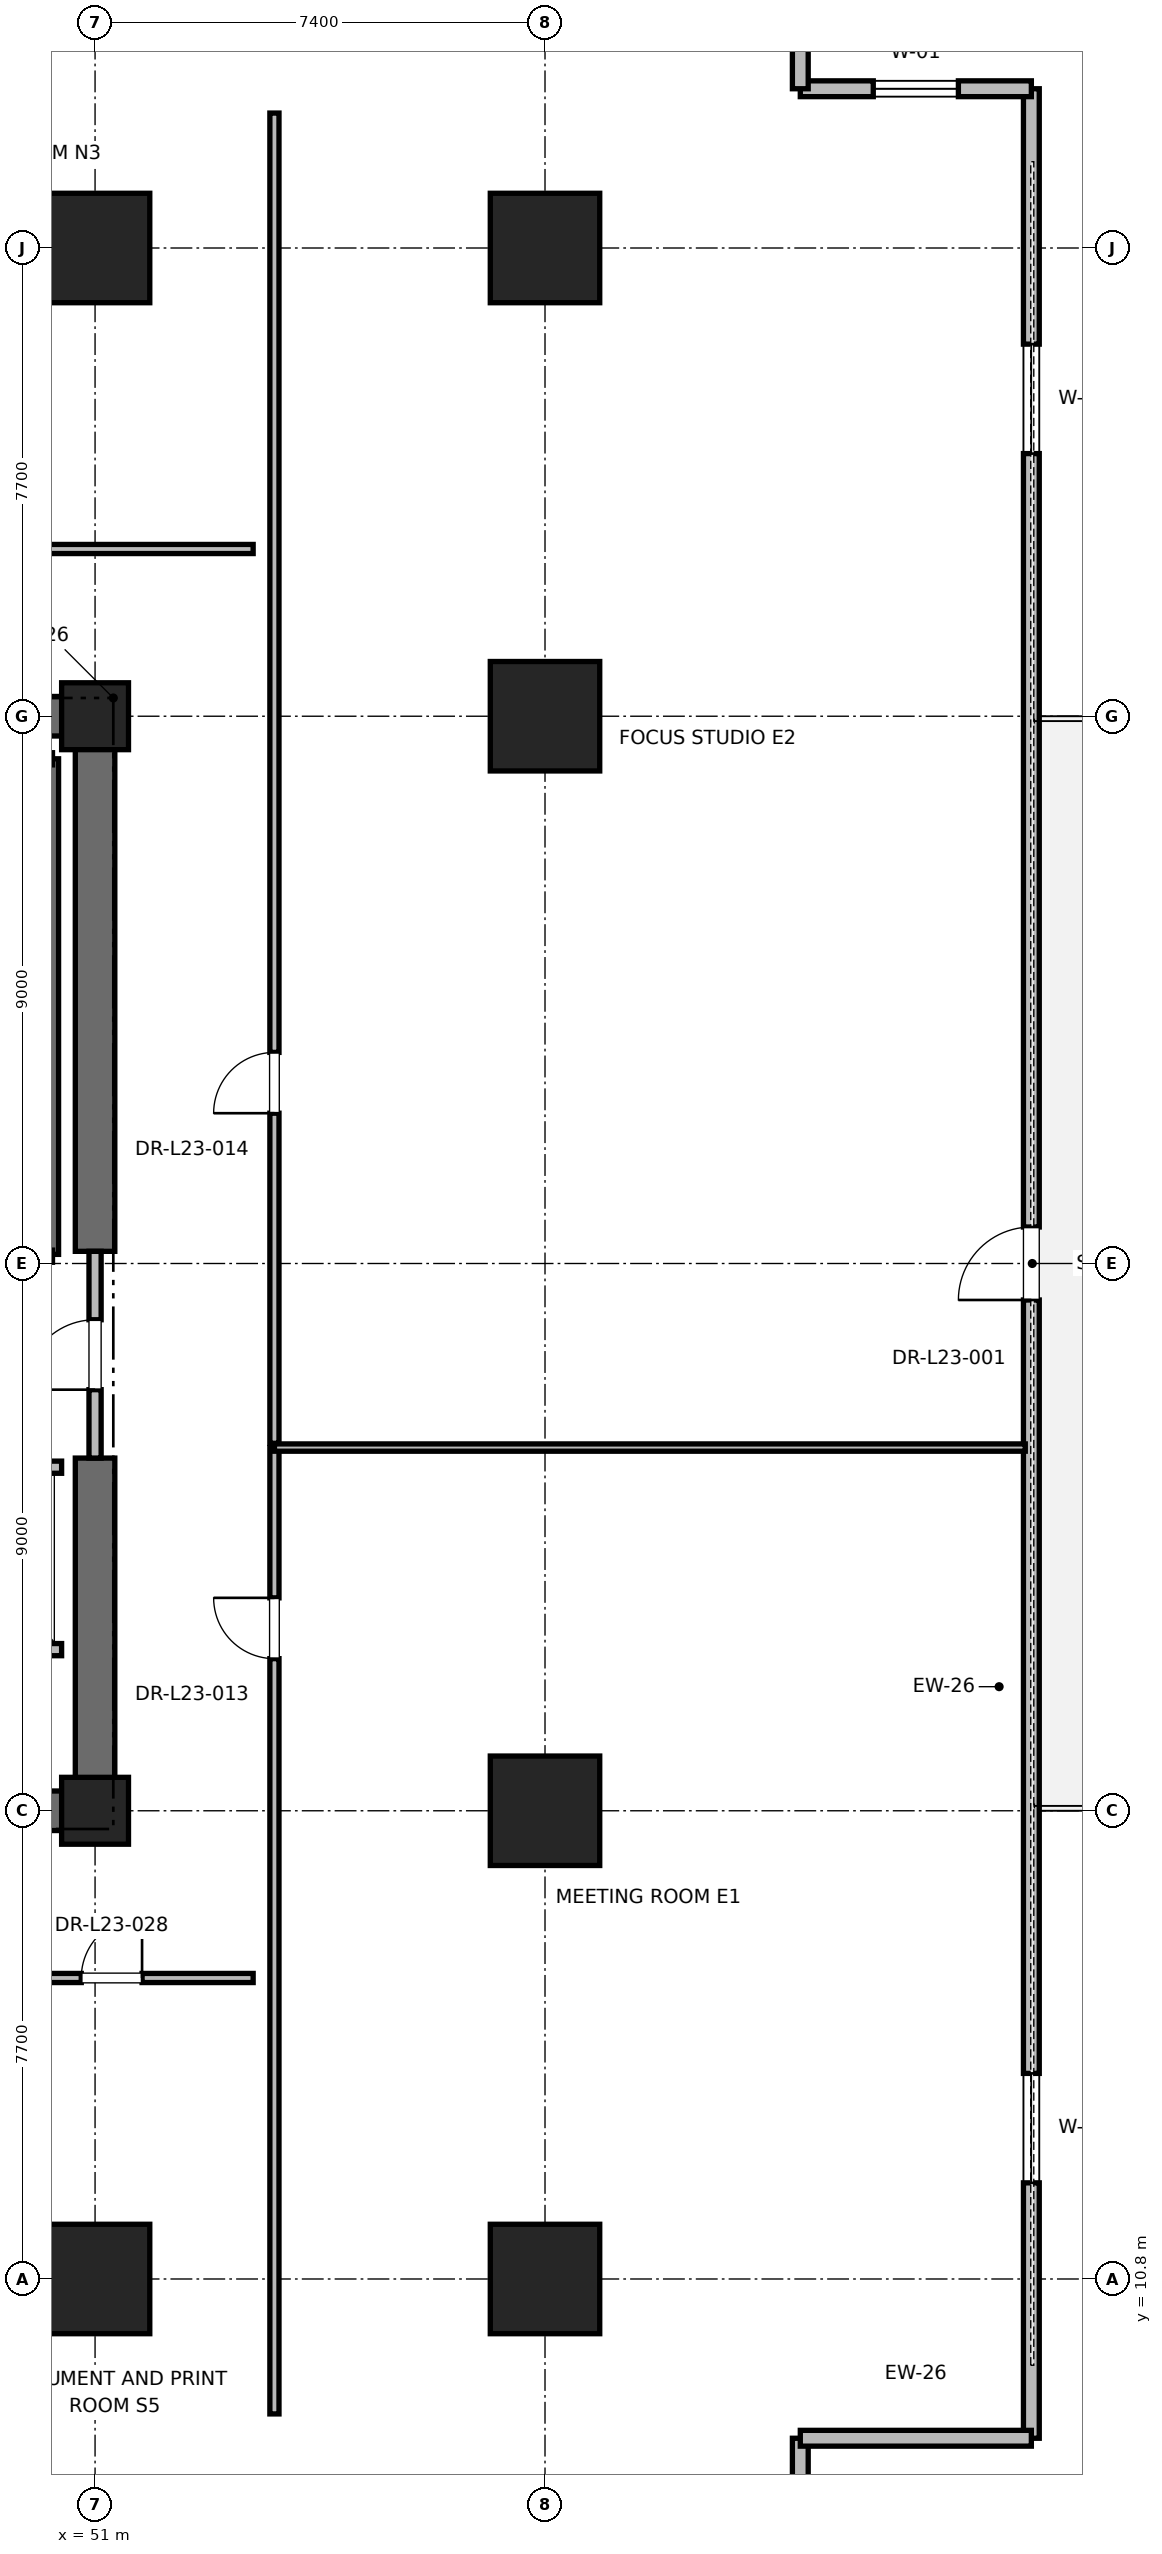
"""IFC4 building model, lengths in metres.
Left out: names, types, materials, properties, quantities, classifications, styles, units other than length and angle.
Written with IfcOpenShell. Run it as: python <this file> out.ifc"""

import sys

from ifc_helpers import new_model, si_unit, direction, frame, frame_2d, origin, origin_2d, place, context, subcontext, project, spatial, rectangle, extrude, element, fill, save


model = new_model("IFC4")
c1 = context("Model", 3, precision=1e-05, world=origin(), true_north=direction((0.0, 1.0)))
c2 = subcontext(c1, "Body", "Model", "MODEL_VIEW")
j1 = project(units=[si_unit("LENGTHUNIT", "METRE"), si_unit("PLANEANGLEUNIT", "RADIAN")], contexts=[c1])
p1 = place(None, origin())
s1 = spatial("IfcSite", under=j1, at=p1, CompositionType="ELEMENT")
p2 = place(p1, origin())
s2 = spatial("IfcBuilding", under=s1, at=p2, CompositionType="ELEMENT")
p3 = place(p2, frame((0.0, 0.0, 99.6)))
s3 = spatial("IfcBuildingStorey", under=s2, at=p3, CompositionType="ELEMENT", Elevation=99.6)
for number, where, z_axis, x_axis in (
    (1, (51.0, 10.8, 0.0), (0.0, 0.0, 1.0), (1.0, 0.0, 0.0)),
    (2, (51.0, 44.2, 0.0), (0.0, 0.0, 1.0), (1.0, 0.0, 0.0)),
    (3, (58.4, 18.5, 0.0), (0.0, 0.0, 1.0), (1.0, 0.0, 0.0)),
    (4, (58.4, 36.5, 0.0), (0.0, 0.0, 1.0), (1.0, 0.0, 0.0)),
    (5, (58.4, 10.8, 0.0), (0.0, 0.0, 1.0), (1.0, 0.0, 0.0)),
    (6, (58.4, 44.2, 0.0), (0.0, 0.0, 1.0), (1.0, 0.0, 0.0)),
):
    element("IfcColumn", number, at=place(p3, frame(where, z_axis=z_axis, x_axis=x_axis)), inside=s3, PredefinedType="COLUMN", context=c2, shape_type="SweptSolid", body=[
        extrude(rectangle(XDim=1.8, YDim=1.8, at=origin_2d()), origin(), (0.0, 0.0, 1.0), 4.0),
    ])
for number, where, z_axis, x_axis in (
    (7, (51.0, 18.5, 0.0), (0.0, 0.0, 1.0), (1.0, 0.0, 0.0)),
    (8, (51.0, 36.5, 0.0), (0.0, 0.0, 1.0), (1.0, 0.0, 0.0)),
):
    element("IfcColumn", number, at=place(p3, frame(where, z_axis=z_axis, x_axis=x_axis)), inside=s3, PredefinedType="PILASTER", context=c2, shape_type="SweptSolid", body=[
        extrude(rectangle(XDim=1.1, YDim=1.1, at=origin_2d()), origin(), (0.0, 0.0, 1.0), 4.0),
    ])
p4 = place(p3, frame((41.8, 18.5, 0.0), z_axis=(0.0, 0.0, 1.0), x_axis=(1.0, 0.0, 0.0)))
e9 = element("IfcWall", 9, at=p4, inside=s3, PredefinedType="SHEAR", context=c2, shape_type="SweptSolid", body=[
    extrude(rectangle(XDim=9.2, YDim=0.65, at=frame_2d((4.6, 0.0))), origin(), (0.0, 0.0, 1.0), 3.76),
])
for number, where, z_axis, x_axis in (
    (10, (45.2, 36.5, 0.0), (0.0, 0.0, 1.0), (1.0, 0.0, 0.0)),
    (11, (51.0, 18.5, 0.0), (0.0, 0.0, 1.0), (0.0, 1.0, 0.0)),
):
    element("IfcWall", number, at=place(p3, frame(where, z_axis=z_axis, x_axis=x_axis)), inside=s3, PredefinedType="SHEAR", context=c2, shape_type="SweptSolid", body=[
        extrude(rectangle(XDim=5.8, YDim=0.65, at=frame_2d((2.9, 0.0))), origin(), (0.0, 0.0, 1.0), 3.76),
    ])
p5 = place(p3, frame((51.0, 27.7, 0.0), z_axis=(0.0, 0.0, 1.0), x_axis=(0.0, 1.0, 0.0)))
e12 = element("IfcWall", 12, at=p5, inside=s3, PredefinedType="SHEAR", context=c2, shape_type="SweptSolid", body=[
    extrude(rectangle(XDim=8.8, YDim=0.65, at=frame_2d((4.4, 0.0))), origin(), (0.0, 0.0, 1.0), 3.76),
])
p6 = place(p3, frame((66.399, 8.181, 0.0), z_axis=(0.0, 0.0, 1.0), x_axis=(0.0, 1.0, 0.0)))
e13 = element("IfcWall", 13, at=p6, inside=s3, PredefinedType="PARAPET", context=c2, shape_type="SweptSolid", body=[
    extrude(rectangle(XDim=38.638, YDim=0.26, at=frame_2d((19.319, 0.0))), origin(), (0.0, 0.0, 1.0), 2.889),
])
p7 = place(p6, frame((4.2, 0.0, 0.85)))
e14 = element("IfcOpeningElement", 14, at=p7, cuts=e13, PredefinedType="OPENING", context=c2, shape_type="SweptSolid", body=[
    extrude(rectangle(XDim=1.8, YDim=2.2, at=frame_2d((0.9, 1.1))), frame((0.0, 0.13, 0.0), z_axis=(0.0, -1.0, 0.0), x_axis=(1.0, 0.0, 0.0)), (0.0, 0.0, 1.0), 0.26),
])
p8 = place(p6, frame((18.719, 0.0, 0.0)))
e15 = element("IfcOpeningElement", 15, at=p8, cuts=e13, PredefinedType="OPENING", context=c2, shape_type="SweptSolid", body=[
    extrude(rectangle(XDim=1.2, YDim=2.2, at=frame_2d((0.6, 1.1))), frame((0.0, 0.13, 0.0), z_axis=(0.0, -1.0, 0.0), x_axis=(1.0, 0.0, 0.0)), (0.0, 0.0, 1.0), 0.26),
])
p9 = place(p6, frame((32.638, 0.0, 0.85)))
e16 = element("IfcOpeningElement", 16, at=p9, cuts=e13, PredefinedType="OPENING", context=c2, shape_type="SweptSolid", body=[
    extrude(rectangle(XDim=1.8, YDim=2.2, at=frame_2d((0.9, 1.1))), frame((0.0, 0.13, 0.0), z_axis=(0.0, -1.0, 0.0), x_axis=(1.0, 0.0, 0.0)), (0.0, 0.0, 1.0), 0.26),
])
p10 = place(p3, frame((62.599, 4.781, 0.0), z_axis=(0.0, 0.0, 1.0), x_axis=(0.0, 1.0, 0.0)))
e17 = element("IfcWall", 17, at=p10, inside=s3, PredefinedType="PARAPET", context=c2, shape_type="SweptSolid", body=[
    extrude(rectangle(XDim=3.4, YDim=0.26, at=frame_2d((1.7, 0.0))), origin(), (0.0, 0.0, 1.0), 3.76),
])
p11 = place(p10, frame((1.0, 0.0, 0.85)))
e18 = element("IfcOpeningElement", 18, at=p11, cuts=e17, PredefinedType="OPENING", context=c2, shape_type="SweptSolid", body=[
    extrude(rectangle(XDim=1.4, YDim=2.0, at=frame_2d((0.7, 1.0))), frame((0.0, 0.13, 0.0), z_axis=(0.0, -1.0, 0.0), x_axis=(1.0, 0.0, 0.0)), (0.0, 0.0, 1.0), 0.26),
])
p12 = place(p3, frame((62.599, 8.181, 0.0), z_axis=(0.0, 0.0, 1.0), x_axis=(1.0, 0.0, 0.0)))
e19 = element("IfcWall", 19, at=p12, inside=s3, PredefinedType="PARAPET", context=c2, shape_type="SweptSolid", body=[
    extrude(rectangle(XDim=3.8, YDim=0.26, at=frame_2d((1.9, 0.0))), origin(), (0.0, 0.0, 1.0), 3.76),
])
p13 = place(p3, frame((66.399, 46.819, 0.0), z_axis=(0.0, 0.0, 1.0), x_axis=(-1.0, 0.0, 0.0)))
e20 = element("IfcWall", 20, at=p13, inside=s3, PredefinedType="PARAPET", context=c2, shape_type="SweptSolid", body=[
    extrude(rectangle(XDim=3.8, YDim=0.26, at=frame_2d((1.9, 0.0))), origin(), (0.0, 0.0, 1.0), 3.76),
])
p14 = place(p13, frame((1.2, 0.0, 0.85)))
e21 = element("IfcOpeningElement", 21, at=p14, cuts=e20, PredefinedType="OPENING", context=c2, shape_type="SweptSolid", body=[
    extrude(rectangle(XDim=1.4, YDim=2.0, at=frame_2d((0.7, 1.0))), frame((0.0, 0.13, 0.0), z_axis=(0.0, -1.0, 0.0), x_axis=(1.0, 0.0, 0.0)), (0.0, 0.0, 1.0), 0.26),
])
p15 = place(p3, frame((62.599, 46.819, 0.0), z_axis=(0.0, 0.0, 1.0), x_axis=(0.0, 1.0, 0.0)))
e22 = element("IfcWall", 22, at=p15, inside=s3, PredefinedType="PARAPET", context=c2, shape_type="SweptSolid", body=[
    extrude(rectangle(XDim=3.4, YDim=0.26, at=frame_2d((1.7, 0.0))), origin(), (0.0, 0.0, 1.0), 3.76),
])
p16 = place(p3, frame((50.3, 27.65, 0.0), z_axis=(0.0, 0.0, 1.0), x_axis=(0.0, 1.0, 0.0)))
e23 = element("IfcWall", 23, at=p16, inside=s3, PredefinedType="SOLIDWALL", context=c2, shape_type="SweptSolid", body=[
    extrude(rectangle(XDim=8.15, YDim=0.2, at=frame_2d((4.075, 0.0))), origin(), (0.0, 0.0, 1.0), 3.76),
])
p17 = place(p3, frame((51.0, 24.3, 0.0), z_axis=(0.0, 0.0, 1.0), x_axis=(0.0, 1.0, 0.0)))
e24 = element("IfcWall", 24, at=p17, inside=s3, PredefinedType="PARTITIONING", context=c2, shape_type="SweptSolid", body=[
    extrude(rectangle(XDim=3.4, YDim=0.2, at=frame_2d((1.7, 0.0))), origin(), (0.0, 0.0, 1.0), 2.54),
])
p18 = place(p17, frame((1.125, 0.0, 0.0)))
e25 = element("IfcOpeningElement", 25, at=p18, cuts=e24, PredefinedType="OPENING", context=c2, shape_type="SweptSolid", body=[
    extrude(rectangle(XDim=1.15, YDim=2.2, at=frame_2d((0.575, 1.1))), frame((0.0, 0.1, 0.0), z_axis=(0.0, -1.0, 0.0), x_axis=(1.0, 0.0, 0.0)), (0.0, 0.0, 1.0), 0.2),
])
p19 = place(p3, frame((47.85, 21.15, 0.0), z_axis=(0.0, 0.0, 1.0), x_axis=(1.0, 0.0, 0.0)))
e26 = element("IfcWall", 26, at=p19, inside=s3, PredefinedType="SOLIDWALL", context=c2, shape_type="SweptSolid", body=[
    extrude(rectangle(XDim=2.6, YDim=0.2, at=frame_2d((1.3, 0.0))), origin(), (0.0, 0.0, 1.0), 3.76),
])
p20 = place(p3, frame((50.45, 24.15, 0.0), z_axis=(0.0, 0.0, 1.0), x_axis=(-1.0, 0.0, 0.0)))
e27 = element("IfcWall", 27, at=p20, inside=s3, PredefinedType="SOLIDWALL", context=c2, shape_type="SweptSolid", body=[
    extrude(rectangle(XDim=2.6, YDim=0.2, at=frame_2d((1.3, 0.0))), origin(), (0.0, 0.0, 1.0), 2.54),
])
p21 = place(p20, frame((0.75, 0.0, 0.0)))
e28 = element("IfcOpeningElement", 28, at=p21, cuts=e27, PredefinedType="OPENING", context=c2, shape_type="SweptSolid", body=[
    extrude(rectangle(XDim=1.1, YDim=2.2, at=frame_2d((0.55, 1.1))), frame((0.0, 0.1, 0.0), z_axis=(0.0, -1.0, 0.0), x_axis=(1.0, 0.0, 0.0)), (0.0, 0.0, 1.0), 0.2),
])
p22 = place(p3, frame((44.694, 39.25, 0.0), z_axis=(0.0, 0.0, 1.0), x_axis=(1.0, 0.0, 0.0)))
e29 = element("IfcWall", 29, at=p22, inside=s3, PredefinedType="PARTITIONING", context=c2, shape_type="SweptSolid", body=[
    extrude(rectangle(XDim=8.906, YDim=0.15, at=frame_2d((4.453, 0.0))), origin(), (0.0, 0.0, 1.0), 2.85),
])
p23 = place(p22, frame((3.653, 0.0, 0.0)))
e30 = element("IfcOpeningElement", 30, at=p23, cuts=e29, PredefinedType="OPENING", context=c2, shape_type="SweptSolid", body=[
    extrude(rectangle(XDim=1.5, YDim=2.25, at=frame_2d((0.75, 1.125))), frame((0.0, 0.075, 0.0), z_axis=(0.0, -1.0, 0.0), x_axis=(1.0, 0.0, 0.0)), (0.0, 0.0, 1.0), 0.15),
])
p24 = place(p3, frame((49.046, 15.75, 0.0), z_axis=(0.0, 0.0, 1.0), x_axis=(1.0, 0.0, 0.0)))
e31 = element("IfcWall", 31, at=p24, inside=s3, PredefinedType="PARTITIONING", context=c2, shape_type="SweptSolid", body=[
    extrude(rectangle(XDim=4.554, YDim=0.15, at=frame_2d((2.277, 0.0))), origin(), (0.0, 0.0, 1.0), 2.85),
])
p25 = place(p24, frame((1.727, 0.0, 0.0)))
e32 = element("IfcOpeningElement", 32, at=p25, cuts=e31, PredefinedType="OPENING", context=c2, shape_type="SweptSolid", body=[
    extrude(rectangle(XDim=1.0, YDim=2.15, at=frame_2d((0.5, 1.075))), frame((0.0, 0.075, 0.0), z_axis=(0.0, -1.0, 0.0), x_axis=(1.0, 0.0, 0.0)), (0.0, 0.0, 1.0), 0.15),
])
p26 = place(p3, frame((53.95, 8.581, 0.0), z_axis=(0.0, 0.0, 1.0), x_axis=(0.0, 1.0, 0.0)))
e33 = element("IfcWall", 33, at=p26, inside=s3, PredefinedType="PARTITIONING", context=c2, shape_type="SweptSolid", body=[
    extrude(rectangle(XDim=15.892, YDim=0.15, at=frame_2d((7.946, 0.0))), origin(), (0.0, 0.0, 1.0), 2.85),
])
p27 = place(p26, frame((12.42, 0.0, 0.0)))
e34 = element("IfcOpeningElement", 34, at=p27, cuts=e33, PredefinedType="OPENING", context=c2, shape_type="SweptSolid", body=[
    extrude(rectangle(XDim=1.0, YDim=2.15, at=frame_2d((0.5, 1.075))), frame((0.0, 0.075, 0.0), z_axis=(0.0, -1.0, 0.0), x_axis=(1.0, 0.0, 0.0)), (0.0, 0.0, 1.0), 0.15),
])
p28 = place(p3, frame((53.95, 24.473, 0.0), z_axis=(0.0, 0.0, 1.0), x_axis=(1.0, 0.0, 0.0)))
e35 = element("IfcWall", 35, at=p28, inside=s3, PredefinedType="PARTITIONING", context=c2, shape_type="SweptSolid", body=[
    extrude(rectangle(XDim=12.349, YDim=0.12, at=frame_2d((6.174, 0.0))), origin(), (0.0, 0.0, 1.0), 2.85),
])
p29 = place(p3, frame((53.95, 24.543, 0.0), z_axis=(0.0, 0.0, 1.0), x_axis=(0.0, 1.0, 0.0)))
e36 = element("IfcWall", 36, at=p29, inside=s3, PredefinedType="PARTITIONING", context=c2, shape_type="SweptSolid", body=[
    extrude(rectangle(XDim=21.876, YDim=0.15, at=frame_2d((10.938, 0.0))), origin(), (0.0, 0.0, 1.0), 2.85),
])
p30 = place(p29, frame((5.428, 0.0, 0.0)))
e37 = element("IfcOpeningElement", 37, at=p30, cuts=e36, PredefinedType="OPENING", context=c2, shape_type="SweptSolid", body=[
    extrude(rectangle(XDim=1.0, YDim=2.15, at=frame_2d((0.5, 1.075))), frame((0.0, 0.075, 0.0), z_axis=(0.0, -1.0, 0.0), x_axis=(1.0, 0.0, 0.0)), (0.0, 0.0, 1.0), 0.15),
])
p31 = place(p7, origin())
e38 = element("IfcWindow", 38, at=p31, inside=s3, PartitioningType="SINGLE_PANEL", PredefinedType="WINDOW", context=c2, shape_type="SweptSolid", body=[
    extrude(rectangle(XDim=1.8, YDim=2.2, at=frame_2d((0.9, 1.1))), frame((0.0, 0.03, 0.0), z_axis=(0.0, -1.0, 0.0), x_axis=(1.0, 0.0, 0.0)), (0.0, 0.0, 1.0), 0.06),
])
fill(e14, e38)
p32 = place(p8, origin())
e39 = element("IfcDoor", 39, at=p32, inside=s3, OperationType="SINGLE_SWING_LEFT", PredefinedType="DOOR", context=c2, shape_type="SweptSolid", body=[
    extrude(rectangle(XDim=1.2, YDim=2.2, at=frame_2d((0.6, 1.1))), frame((0.0, 0.025, 0.0), z_axis=(0.0, -1.0, 0.0), x_axis=(1.0, 0.0, 0.0)), (0.0, 0.0, 1.0), 0.05),
])
fill(e15, e39)
p33 = place(p9, origin())
e40 = element("IfcWindow", 40, at=p33, inside=s3, PartitioningType="SINGLE_PANEL", PredefinedType="WINDOW", context=c2, shape_type="SweptSolid", body=[
    extrude(rectangle(XDim=1.8, YDim=2.2, at=frame_2d((0.9, 1.1))), frame((0.0, 0.03, 0.0), z_axis=(0.0, -1.0, 0.0), x_axis=(1.0, 0.0, 0.0)), (0.0, 0.0, 1.0), 0.06),
])
fill(e16, e40)
p34 = place(p14, origin())
e41 = element("IfcWindow", 41, at=p34, inside=s3, PartitioningType="SINGLE_PANEL", PredefinedType="WINDOW", context=c2, shape_type="SweptSolid", body=[
    extrude(rectangle(XDim=1.4, YDim=2.0, at=frame_2d((0.7, 1.0))), frame((0.0, 0.03, 0.0), z_axis=(0.0, -1.0, 0.0), x_axis=(1.0, 0.0, 0.0)), (0.0, 0.0, 1.0), 0.06),
])
fill(e21, e41)
p35 = place(p18, origin())
e42 = element("IfcDoor", 42, at=p35, inside=s3, OperationType="SINGLE_SWING_LEFT", PredefinedType="DOOR", context=c2, shape_type="SweptSolid", body=[
    extrude(rectangle(XDim=1.15, YDim=2.2, at=frame_2d((0.575, 1.1))), frame((0.0, 0.025, 0.0), z_axis=(0.0, -1.0, 0.0), x_axis=(1.0, 0.0, 0.0)), (0.0, 0.0, 1.0), 0.05),
])
fill(e25, e42)
p36 = place(p25, origin())
e43 = element("IfcDoor", 43, at=p36, inside=s3, OperationType="SINGLE_SWING_RIGHT", PredefinedType="DOOR", context=c2, shape_type="SweptSolid", body=[
    extrude(rectangle(XDim=1.0, YDim=2.15, at=frame_2d((0.5, 1.075))), frame((0.0, 0.025, 0.0), z_axis=(0.0, -1.0, 0.0), x_axis=(1.0, 0.0, 0.0)), (0.0, 0.0, 1.0), 0.05),
])
fill(e32, e43)
p37 = place(p27, origin())
e44 = element("IfcDoor", 44, at=p37, inside=s3, OperationType="SINGLE_SWING_RIGHT", PredefinedType="DOOR", context=c2, shape_type="SweptSolid", body=[
    extrude(rectangle(XDim=1.0, YDim=2.15, at=frame_2d((0.5, 1.075))), frame((0.0, 0.025, 0.0), z_axis=(0.0, -1.0, 0.0), x_axis=(1.0, 0.0, 0.0)), (0.0, 0.0, 1.0), 0.05),
])
fill(e34, e44)
p38 = place(p30, origin())
e45 = element("IfcDoor", 45, at=p38, inside=s3, OperationType="SINGLE_SWING_LEFT", PredefinedType="DOOR", context=c2, shape_type="SweptSolid", body=[
    extrude(rectangle(XDim=1.0, YDim=2.15, at=frame_2d((0.5, 1.075))), frame((0.0, 0.025, 0.0), z_axis=(0.0, -1.0, 0.0), x_axis=(1.0, 0.0, 0.0)), (0.0, 0.0, 1.0), 0.05),
])
fill(e37, e45)
save(model, sys.argv[1])
